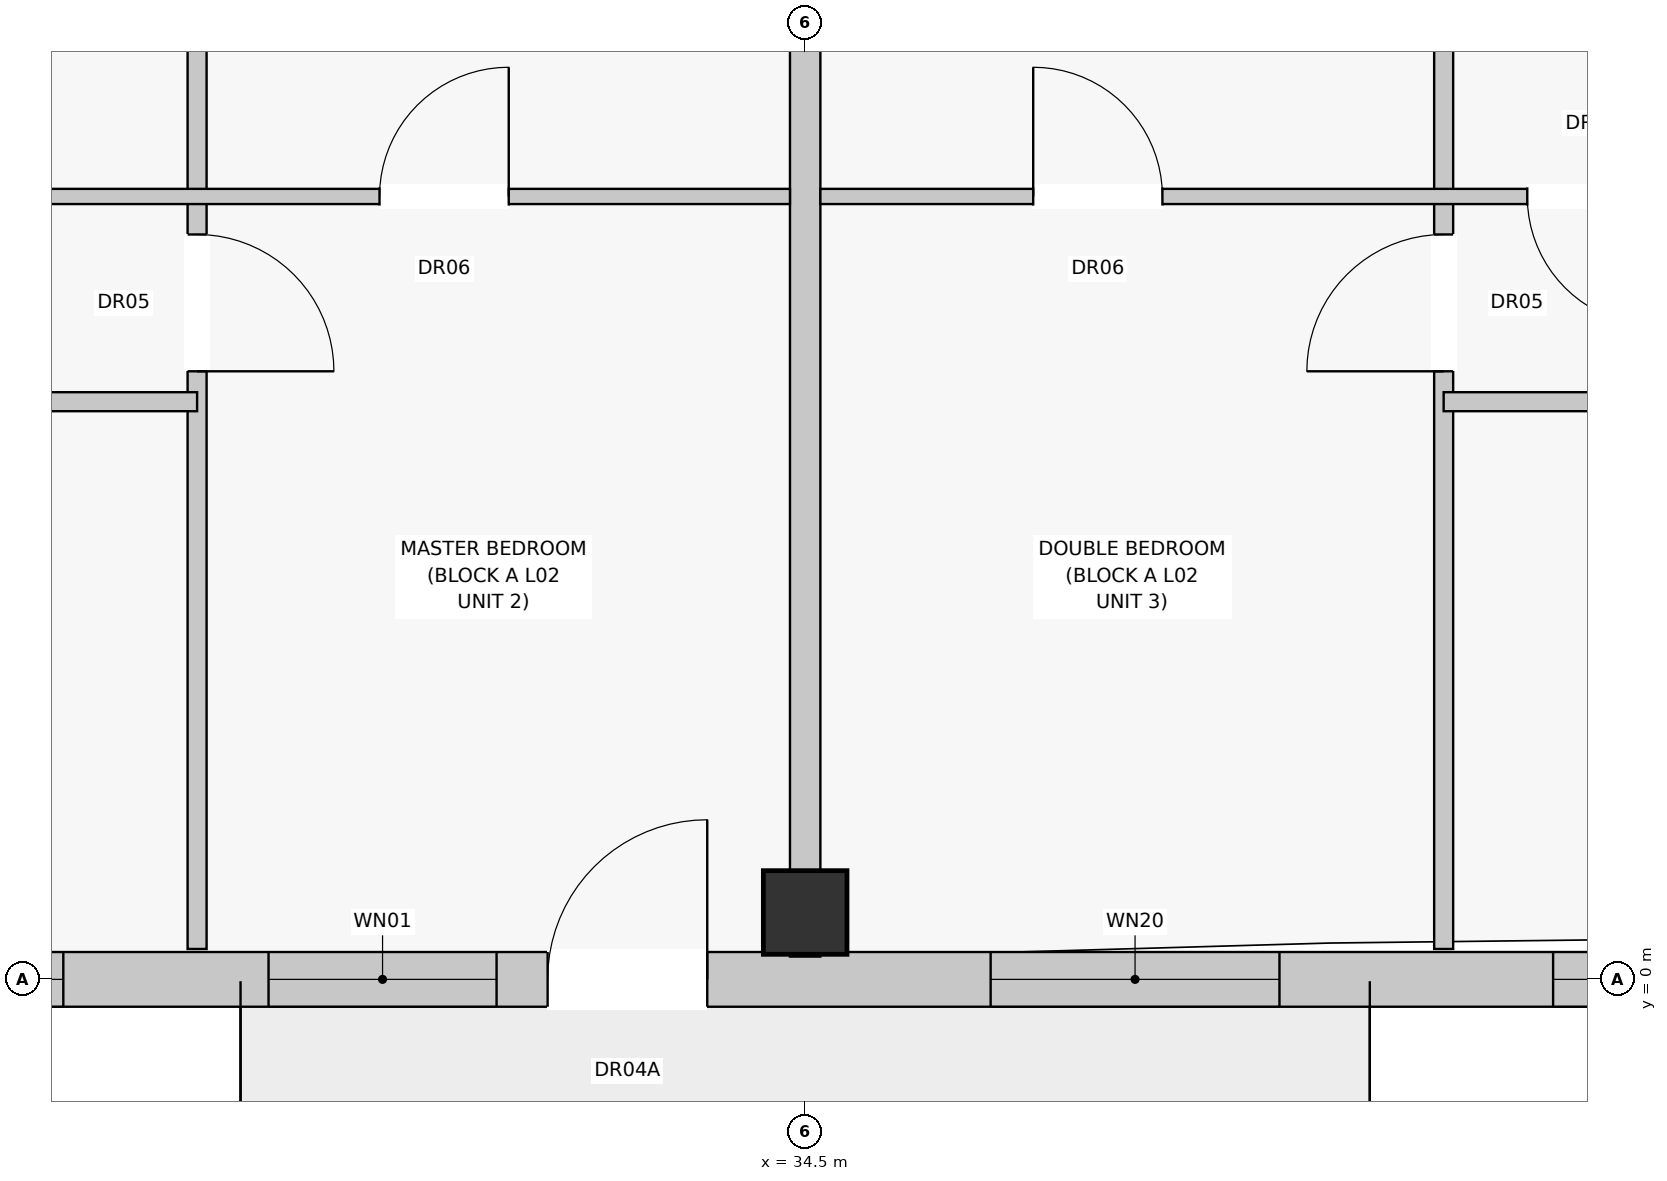
"""IFC4 building model, lengths in metres.
Left out: names, types, materials, properties, quantities, classifications, styles, units other than length and angle.
Written with IfcOpenShell. Run it as: python <this file> out.ifc"""

import sys

from ifc_helpers import new_model, si_unit, direction, frame, frame_2d, origin, origin_with_axes, origin_2d, place, context, subcontext, project, spatial, rectangle, extrude, element, fill, save


model = new_model("IFC4")
c1 = context("Model", 3, precision=1e-05, world=origin(), true_north=direction((0.0, 1.0)))
c2 = subcontext(c1, "Body", "Model", "MODEL_VIEW")
j1 = project(units=[si_unit("LENGTHUNIT", "METRE"), si_unit("PLANEANGLEUNIT", "RADIAN")], contexts=[c1])
p1 = place(None, origin())
s1 = spatial("IfcSite", under=j1, at=p1, CompositionType="ELEMENT")
p2 = place(p1, origin())
s2 = spatial("IfcBuilding", under=s1, at=p2, CompositionType="ELEMENT")
p3 = place(p2, frame((0.0, 0.0, 8.0)))
s3 = spatial("IfcBuildingStorey", under=s2, at=p3, CompositionType="ELEMENT", Elevation=8.0)
p4 = place(p3, frame((34.5, 0.44, 0.0), z_axis=(0.0, 0.0, 1.0), x_axis=(1.0, 0.0, 0.0)))
e1 = element("IfcColumn", 1, at=p4, inside=s3, PredefinedType="COLUMN", context=c2, shape_type="SweptSolid", body=[
    extrude(rectangle(XDim=0.55, YDim=0.55, at=origin_2d()), origin(), (0.0, 0.0, 1.0), 3.2),
])
p5 = place(p3, frame((0.17, 0.0, 0.0), z_axis=(0.0, 0.0, 1.0), x_axis=(1.0, 0.0, 0.0)))
e2 = element("IfcWall", 2, at=p5, inside=s3, PredefinedType="STANDARD", context=c2, shape_type="SweptSolid", body=[
    extrude(rectangle(XDim=54.86, YDim=0.36, at=frame_2d((27.43, 0.0))), origin(), (0.0, 0.0, 1.0), 2.94),
])
p6 = place(p5, frame((3.736, 0.0, 0.0)))
e3 = element("IfcOpeningElement", 3, at=p6, cuts=e2, PredefinedType="OPENING", context=c2, shape_type="SweptSolid", body=[
    extrude(rectangle(XDim=1.05, YDim=2.12, at=frame_2d((0.525, 1.06))), frame((0.0, 0.192, 0.0), z_axis=(0.0, -1.0, 0.0), x_axis=(1.0, 0.0, 0.0)), (0.0, 0.0, 1.0), 0.384),
])
p7 = place(p5, frame((18.636, 0.0, 0.0)))
e4 = element("IfcOpeningElement", 4, at=p7, cuts=e2, PredefinedType="OPENING", context=c2, shape_type="SweptSolid", body=[
    extrude(rectangle(XDim=1.05, YDim=2.12, at=frame_2d((0.525, 1.06))), frame((0.0, 0.192, 0.0), z_axis=(0.0, -1.0, 0.0), x_axis=(1.0, 0.0, 0.0)), (0.0, 0.0, 1.0), 0.384),
])
p8 = place(p5, frame((32.636, 0.0, 0.0)))
e5 = element("IfcOpeningElement", 5, at=p8, cuts=e2, PredefinedType="OPENING", context=c2, shape_type="SweptSolid", body=[
    extrude(rectangle(XDim=1.05, YDim=2.12, at=frame_2d((0.525, 1.06))), frame((0.0, 0.192, 0.0), z_axis=(0.0, -1.0, 0.0), x_axis=(1.0, 0.0, 0.0)), (0.0, 0.0, 1.0), 0.384),
])
p9 = place(p5, frame((46.441, 0.0, 0.0)))
e6 = element("IfcOpeningElement", 6, at=p9, cuts=e2, PredefinedType="OPENING", context=c2, shape_type="SweptSolid", body=[
    extrude(rectangle(XDim=1.05, YDim=2.12, at=frame_2d((0.525, 1.06))), frame((0.0, 0.192, 0.0), z_axis=(0.0, -1.0, 0.0), x_axis=(1.0, 0.0, 0.0)), (0.0, 0.0, 1.0), 0.384),
])
p10 = place(p5, frame((1.95, 0.0, 0.72)))
e7 = element("IfcOpeningElement", 7, at=p10, cuts=e2, PredefinedType="OPENING", context=c2, shape_type="SweptSolid", body=[
    extrude(rectangle(XDim=1.1, YDim=1.5, at=frame_2d((0.55, 0.75))), frame((0.0, 0.192, 0.0), z_axis=(0.0, -1.0, 0.0), x_axis=(1.0, 0.0, 0.0)), (0.0, 0.0, 1.0), 0.384),
])
p11 = place(p5, frame((7.232, 0.0, 0.72)))
e8 = element("IfcOpeningElement", 8, at=p11, cuts=e2, PredefinedType="OPENING", context=c2, shape_type="SweptSolid", body=[
    extrude(rectangle(XDim=1.9, YDim=1.85, at=frame_2d((0.95, 0.925))), frame((0.0, 0.192, 0.0), z_axis=(0.0, -1.0, 0.0), x_axis=(1.0, 0.0, 0.0)), (0.0, 0.0, 1.0), 0.384),
])
p12 = place(p5, frame((10.85, 0.0, 0.72)))
e9 = element("IfcOpeningElement", 9, at=p12, cuts=e2, PredefinedType="OPENING", context=c2, shape_type="SweptSolid", body=[
    extrude(rectangle(XDim=1.1, YDim=1.5, at=frame_2d((0.55, 0.75))), frame((0.0, 0.192, 0.0), z_axis=(0.0, -1.0, 0.0), x_axis=(1.0, 0.0, 0.0)), (0.0, 0.0, 1.0), 0.384),
])
p13 = place(p5, frame((16.25, 0.0, 0.72)))
e10 = element("IfcOpeningElement", 10, at=p13, cuts=e2, PredefinedType="OPENING", context=c2, shape_type="SweptSolid", body=[
    extrude(rectangle(XDim=1.1, YDim=1.5, at=frame_2d((0.55, 0.75))), frame((0.0, 0.192, 0.0), z_axis=(0.0, -1.0, 0.0), x_axis=(1.0, 0.0, 0.0)), (0.0, 0.0, 1.0), 0.384),
])
p14 = place(p5, frame((21.55, 0.0, 0.72)))
e11 = element("IfcOpeningElement", 11, at=p14, cuts=e2, PredefinedType="OPENING", context=c2, shape_type="SweptSolid", body=[
    extrude(rectangle(XDim=1.9, YDim=1.85, at=frame_2d((0.95, 0.925))), frame((0.0, 0.192, 0.0), z_axis=(0.0, -1.0, 0.0), x_axis=(1.0, 0.0, 0.0)), (0.0, 0.0, 1.0), 0.384),
])
p15 = place(p5, frame((28.35, 0.0, 0.72)))
e12 = element("IfcOpeningElement", 12, at=p15, cuts=e2, PredefinedType="OPENING", context=c2, shape_type="SweptSolid", body=[
    extrude(rectangle(XDim=1.1, YDim=1.5, at=frame_2d((0.55, 0.75))), frame((0.0, 0.192, 0.0), z_axis=(0.0, -1.0, 0.0), x_axis=(1.0, 0.0, 0.0)), (0.0, 0.0, 1.0), 0.384),
])
p16 = place(p5, frame((30.8, 0.0, 0.85)))
e13 = element("IfcOpeningElement", 13, at=p16, cuts=e2, PredefinedType="OPENING", context=c2, shape_type="SweptSolid", body=[
    extrude(rectangle(XDim=1.5, YDim=1.65, at=frame_2d((0.75, 0.825))), frame((0.0, 0.192, 0.0), z_axis=(0.0, -1.0, 0.0), x_axis=(1.0, 0.0, 0.0)), (0.0, 0.0, 1.0), 0.384),
])
p17 = place(p5, frame((35.55, 0.0, 0.72)))
e14 = element("IfcOpeningElement", 14, at=p17, cuts=e2, PredefinedType="OPENING", context=c2, shape_type="SweptSolid", body=[
    extrude(rectangle(XDim=1.9, YDim=1.85, at=frame_2d((0.95, 0.925))), frame((0.0, 0.192, 0.0), z_axis=(0.0, -1.0, 0.0), x_axis=(1.0, 0.0, 0.0)), (0.0, 0.0, 1.0), 0.384),
])
p18 = place(p5, frame((39.25, 0.0, 0.72)))
e15 = element("IfcOpeningElement", 15, at=p18, cuts=e2, PredefinedType="OPENING", context=c2, shape_type="SweptSolid", body=[
    extrude(rectangle(XDim=1.1, YDim=1.5, at=frame_2d((0.55, 0.75))), frame((0.0, 0.192, 0.0), z_axis=(0.0, -1.0, 0.0), x_axis=(1.0, 0.0, 0.0)), (0.0, 0.0, 1.0), 0.384),
])
p19 = place(p5, frame((44.3, 0.0, 0.8)))
e16 = element("IfcOpeningElement", 16, at=p19, cuts=e2, PredefinedType="OPENING", context=c2, shape_type="SweptSolid", body=[
    extrude(rectangle(XDim=1.8, YDim=1.7, at=frame_2d((0.9, 0.85))), frame((0.0, 0.192, 0.0), z_axis=(0.0, -1.0, 0.0), x_axis=(1.0, 0.0, 0.0)), (0.0, 0.0, 1.0), 0.384),
])
p20 = place(p5, frame((49.15, 0.0, 0.72)))
e17 = element("IfcOpeningElement", 17, at=p20, cuts=e2, PredefinedType="OPENING", context=c2, shape_type="SweptSolid", body=[
    extrude(rectangle(XDim=1.9, YDim=1.85, at=frame_2d((0.95, 0.925))), frame((0.0, 0.192, 0.0), z_axis=(0.0, -1.0, 0.0), x_axis=(1.0, 0.0, 0.0)), (0.0, 0.0, 1.0), 0.384),
])
p21 = place(p5, frame((52.95, 0.0, 0.72)))
e18 = element("IfcOpeningElement", 18, at=p21, cuts=e2, PredefinedType="OPENING", context=c2, shape_type="SweptSolid", body=[
    extrude(rectangle(XDim=1.1, YDim=1.5, at=frame_2d((0.55, 0.75))), frame((0.0, 0.192, 0.0), z_axis=(0.0, -1.0, 0.0), x_axis=(1.0, 0.0, 0.0)), (0.0, 0.0, 1.0), 0.384),
])
p22 = place(p3, frame((34.5, 7.85, 0.0), z_axis=(0.0, 0.0, 1.0), x_axis=(0.0, -1.0, 0.0)))
e19 = element("IfcWall", 19, at=p22, inside=s3, PredefinedType="PARTITIONING", context=c2, shape_type="SweptSolid", body=[
    extrude(rectangle(XDim=7.7, YDim=0.2, at=frame_2d((3.85, 0.0))), origin(), (0.0, 0.0, 1.0), 2.94),
])
p23 = place(p3, frame((30.5, 7.85, 0.0), z_axis=(0.0, 0.0, 1.0), x_axis=(0.0, -1.0, 0.0)))
e20 = element("IfcWall", 20, at=p23, inside=s3, PredefinedType="PARTITIONING", context=c2, shape_type="SweptSolid", body=[
    extrude(rectangle(XDim=7.65, YDim=0.125, at=frame_2d((3.825, 0.0))), origin(), (0.0, 0.0, 1.0), 2.94),
])
p24 = place(p23, frame((2.95, 0.0, 0.0)))
e21 = element("IfcOpeningElement", 21, at=p24, cuts=e20, PredefinedType="OPENING", context=c2, shape_type="SweptSolid", body=[
    extrude(rectangle(XDim=0.9, YDim=2.1, at=frame_2d((0.45, 1.05))), frame((0.0, 0.074, 0.0), z_axis=(0.0, -1.0, 0.0), x_axis=(1.0, 0.0, 0.0)), (0.0, 0.0, 1.0), 0.149),
])
p25 = place(p3, frame((20.1, 5.15, 0.0), z_axis=(0.0, 0.0, 1.0), x_axis=(1.0, 0.0, 0.0)))
e22 = element("IfcWall", 22, at=p25, inside=s3, PredefinedType="PARTITIONING", context=c2, shape_type="SweptSolid", body=[
    extrude(rectangle(XDim=14.3, YDim=0.1, at=frame_2d((7.15, 0.0))), origin(), (0.0, 0.0, 1.0), 2.94),
])
p26 = place(p25, frame((1.6, 0.0, 0.0)))
e23 = element("IfcOpeningElement", 23, at=p26, cuts=e22, PredefinedType="OPENING", context=c2, shape_type="SweptSolid", body=[
    extrude(rectangle(XDim=0.9, YDim=2.1, at=frame_2d((0.45, 1.05))), frame((0.0, 0.062, 0.0), z_axis=(0.0, -1.0, 0.0), x_axis=(1.0, 0.0, 0.0)), (0.0, 0.0, 1.0), 0.124),
])
p27 = place(p25, frame((5.1, 0.0, 0.0)))
e24 = element("IfcOpeningElement", 24, at=p27, cuts=e22, PredefinedType="OPENING", context=c2, shape_type="SweptSolid", body=[
    extrude(rectangle(XDim=0.85, YDim=2.05, at=frame_2d((0.425, 1.025))), frame((0.0, 0.062, 0.0), z_axis=(0.0, -1.0, 0.0), x_axis=(1.0, 0.0, 0.0)), (0.0, 0.0, 1.0), 0.124),
])
p28 = place(p25, frame((8.2, 0.0, 0.0)))
e25 = element("IfcOpeningElement", 25, at=p28, cuts=e22, PredefinedType="OPENING", context=c2, shape_type="SweptSolid", body=[
    extrude(rectangle(XDim=0.85, YDim=2.05, at=frame_2d((0.425, 1.025))), frame((0.0, 0.062, 0.0), z_axis=(0.0, -1.0, 0.0), x_axis=(1.0, 0.0, 0.0)), (0.0, 0.0, 1.0), 0.124),
])
p29 = place(p25, frame((11.6, 0.0, 0.0)))
e26 = element("IfcOpeningElement", 26, at=p29, cuts=e22, PredefinedType="OPENING", context=c2, shape_type="SweptSolid", body=[
    extrude(rectangle(XDim=0.85, YDim=2.05, at=frame_2d((0.425, 1.025))), frame((0.0, 0.062, 0.0), z_axis=(0.0, -1.0, 0.0), x_axis=(1.0, 0.0, 0.0)), (0.0, 0.0, 1.0), 0.124),
])
p30 = place(p3, frame((20.1, 3.8, 0.0), z_axis=(0.0, 0.0, 1.0), x_axis=(1.0, 0.0, 0.0)))
e27 = element("IfcWall", 27, at=p30, inside=s3, PredefinedType="PARTITIONING", context=c2, shape_type="SweptSolid", body=[
    extrude(rectangle(XDim=10.4, YDim=0.125, at=frame_2d((5.2, 0.0))), origin(), (0.0, 0.0, 1.0), 2.94),
])
p31 = place(p30, frame((2.0, 0.0, 0.0)))
e28 = element("IfcOpeningElement", 28, at=p31, cuts=e27, PredefinedType="OPENING", context=c2, shape_type="SweptSolid", body=[
    extrude(rectangle(XDim=0.9, YDim=2.1, at=frame_2d((0.45, 1.05))), frame((0.0, 0.074, 0.0), z_axis=(0.0, -1.0, 0.0), x_axis=(1.0, 0.0, 0.0)), (0.0, 0.0, 1.0), 0.149),
])
p32 = place(p30, frame((7.2, 0.0, 0.0)))
e29 = element("IfcOpeningElement", 29, at=p32, cuts=e27, PredefinedType="OPENING", context=c2, shape_type="SweptSolid", body=[
    extrude(rectangle(XDim=0.9, YDim=2.1, at=frame_2d((0.45, 1.05))), frame((0.0, 0.074, 0.0), z_axis=(0.0, -1.0, 0.0), x_axis=(1.0, 0.0, 0.0)), (0.0, 0.0, 1.0), 0.149),
])
p33 = place(p3, frame((38.7, 7.85, 0.0), z_axis=(0.0, 0.0, 1.0), x_axis=(0.0, -1.0, 0.0)))
e30 = element("IfcWall", 30, at=p33, inside=s3, PredefinedType="PARTITIONING", context=c2, shape_type="SweptSolid", body=[
    extrude(rectangle(XDim=7.65, YDim=0.125, at=frame_2d((3.825, 0.0))), origin(), (0.0, 0.0, 1.0), 2.94),
])
p34 = place(p33, frame((2.95, 0.0, 0.0)))
e31 = element("IfcOpeningElement", 31, at=p34, cuts=e30, PredefinedType="OPENING", context=c2, shape_type="SweptSolid", body=[
    extrude(rectangle(XDim=0.9, YDim=2.1, at=frame_2d((0.45, 1.05))), frame((0.0, 0.074, 0.0), z_axis=(0.0, -1.0, 0.0), x_axis=(1.0, 0.0, 0.0)), (0.0, 0.0, 1.0), 0.149),
])
p35 = place(p3, frame((34.6, 5.15, 0.0), z_axis=(0.0, 0.0, 1.0), x_axis=(1.0, 0.0, 0.0)))
e32 = element("IfcWall", 32, at=p35, inside=s3, PredefinedType="PARTITIONING", context=c2, shape_type="SweptSolid", body=[
    extrude(rectangle(XDim=8.6, YDim=0.1, at=frame_2d((4.3, 0.0))), origin(), (0.0, 0.0, 1.0), 2.94),
])
p36 = place(p35, frame((1.4, 0.0, 0.0)))
e33 = element("IfcOpeningElement", 33, at=p36, cuts=e32, PredefinedType="OPENING", context=c2, shape_type="SweptSolid", body=[
    extrude(rectangle(XDim=0.85, YDim=2.05, at=frame_2d((0.425, 1.025))), frame((0.0, 0.062, 0.0), z_axis=(0.0, -1.0, 0.0), x_axis=(1.0, 0.0, 0.0)), (0.0, 0.0, 1.0), 0.124),
])
p37 = place(p35, frame((4.65, 0.0, 0.0)))
e34 = element("IfcOpeningElement", 34, at=p37, cuts=e32, PredefinedType="OPENING", context=c2, shape_type="SweptSolid", body=[
    extrude(rectangle(XDim=0.85, YDim=2.05, at=frame_2d((0.425, 1.025))), frame((0.0, 0.062, 0.0), z_axis=(0.0, -1.0, 0.0), x_axis=(1.0, 0.0, 0.0)), (0.0, 0.0, 1.0), 0.124),
])
p38 = place(p35, frame((6.8, 0.0, 0.0)))
e35 = element("IfcOpeningElement", 35, at=p38, cuts=e32, PredefinedType="OPENING", context=c2, shape_type="SweptSolid", body=[
    extrude(rectangle(XDim=0.85, YDim=2.1, at=frame_2d((0.425, 1.05))), frame((0.0, 0.062, 0.0), z_axis=(0.0, -1.0, 0.0), x_axis=(1.0, 0.0, 0.0)), (0.0, 0.0, 1.0), 0.124),
])
p39 = place(p3, frame((38.7, 3.8, 0.0), z_axis=(0.0, 0.0, 1.0), x_axis=(1.0, 0.0, 0.0)))
e36 = element("IfcWall", 36, at=p39, inside=s3, PredefinedType="PARTITIONING", context=c2, shape_type="SweptSolid", body=[
    extrude(rectangle(XDim=4.5, YDim=0.125, at=frame_2d((2.25, 0.0))), origin(), (0.0, 0.0, 1.0), 2.94),
])
p40 = place(p39, frame((1.6, 0.0, 0.0)))
e37 = element("IfcOpeningElement", 37, at=p40, cuts=e36, PredefinedType="OPENING", context=c2, shape_type="SweptSolid", body=[
    extrude(rectangle(XDim=0.9, YDim=2.1, at=frame_2d((0.45, 1.05))), frame((0.0, 0.074, 0.0), z_axis=(0.0, -1.0, 0.0), x_axis=(1.0, 0.0, 0.0)), (0.0, 0.0, 1.0), 0.149),
])
p41 = place(p8, origin_with_axes())
e38 = element("IfcDoor", 38, at=p41, inside=s3, OperationType="SINGLE_SWING_RIGHT", PredefinedType="DOOR", context=c2, shape_type="SweptSolid", body=[
    extrude(rectangle(XDim=1.05, YDim=2.12, at=frame_2d((0.525, 1.06))), frame((0.0, 0.025, 0.0), z_axis=(0.0, -1.0, 0.0), x_axis=(1.0, 0.0, 0.0)), (0.0, 0.0, 1.0), 0.05),
])
fill(e5, e38)
p42 = place(p15, origin_with_axes())
e39 = element("IfcWindow", 39, at=p42, inside=s3, PartitioningType="SINGLE_PANEL", PredefinedType="WINDOW", context=c2, shape_type="SweptSolid", body=[
    extrude(rectangle(XDim=1.1, YDim=1.5, at=frame_2d((0.55, 0.75))), frame((0.0, 0.03, 0.0), z_axis=(0.0, -1.0, 0.0), x_axis=(1.0, 0.0, 0.0)), (0.0, 0.0, 1.0), 0.06),
])
fill(e12, e39)
p43 = place(p16, origin_with_axes())
e40 = element("IfcWindow", 40, at=p43, inside=s3, PartitioningType="SINGLE_PANEL", PredefinedType="WINDOW", context=c2, shape_type="SweptSolid", body=[
    extrude(rectangle(XDim=1.5, YDim=1.65, at=frame_2d((0.75, 0.825))), frame((0.0, 0.03, 0.0), z_axis=(0.0, -1.0, 0.0), x_axis=(1.0, 0.0, 0.0)), (0.0, 0.0, 1.0), 0.06),
])
fill(e13, e40)
p44 = place(p17, origin_with_axes())
e41 = element("IfcWindow", 41, at=p44, inside=s3, PartitioningType="SINGLE_PANEL", PredefinedType="WINDOW", context=c2, shape_type="SweptSolid", body=[
    extrude(rectangle(XDim=1.9, YDim=1.85, at=frame_2d((0.95, 0.925))), frame((0.0, 0.03, 0.0), z_axis=(0.0, -1.0, 0.0), x_axis=(1.0, 0.0, 0.0)), (0.0, 0.0, 1.0), 0.06),
])
fill(e14, e41)
p45 = place(p18, origin_with_axes())
e42 = element("IfcWindow", 42, at=p45, inside=s3, PartitioningType="SINGLE_PANEL", PredefinedType="WINDOW", context=c2, shape_type="SweptSolid", body=[
    extrude(rectangle(XDim=1.1, YDim=1.5, at=frame_2d((0.55, 0.75))), frame((0.0, 0.03, 0.0), z_axis=(0.0, -1.0, 0.0), x_axis=(1.0, 0.0, 0.0)), (0.0, 0.0, 1.0), 0.06),
])
fill(e15, e42)
p46 = place(p24, origin_with_axes())
e43 = element("IfcDoor", 43, at=p46, inside=s3, OperationType="SINGLE_SWING_RIGHT", PredefinedType="DOOR", context=c2, shape_type="SweptSolid", body=[
    extrude(rectangle(XDim=0.9, YDim=2.1, at=frame_2d((0.45, 1.05))), frame((0.0, 0.025, 0.0), z_axis=(0.0, -1.0, 0.0), x_axis=(1.0, 0.0, 0.0)), (0.0, 0.0, 1.0), 0.05),
])
fill(e21, e43)
p47 = place(p29, origin_with_axes())
e44 = element("IfcDoor", 44, at=p47, inside=s3, OperationType="SINGLE_SWING_RIGHT", PredefinedType="DOOR", context=c2, shape_type="SweptSolid", body=[
    extrude(rectangle(XDim=0.85, YDim=2.05, at=frame_2d((0.425, 1.025))), frame((0.0, 0.025, 0.0), z_axis=(0.0, -1.0, 0.0), x_axis=(1.0, 0.0, 0.0)), (0.0, 0.0, 1.0), 0.05),
])
fill(e26, e44)
p48 = place(p34, frame((0.9, 0.0, 0.0), z_axis=(0.0, 0.0, 1.0), x_axis=(-1.0, 0.0, 0.0)))
e45 = element("IfcDoor", 45, at=p48, inside=s3, OperationType="SINGLE_SWING_RIGHT", PredefinedType="DOOR", context=c2, shape_type="SweptSolid", body=[
    extrude(rectangle(XDim=0.9, YDim=2.1, at=frame_2d((0.45, 1.05))), frame((0.0, 0.025, 0.0), z_axis=(0.0, -1.0, 0.0), x_axis=(1.0, 0.0, 0.0)), (0.0, 0.0, 1.0), 0.05),
])
fill(e31, e45)
p49 = place(p36, origin_with_axes())
e46 = element("IfcDoor", 46, at=p49, inside=s3, OperationType="SINGLE_SWING_LEFT", PredefinedType="DOOR", context=c2, shape_type="SweptSolid", body=[
    extrude(rectangle(XDim=0.85, YDim=2.05, at=frame_2d((0.425, 1.025))), frame((0.0, 0.025, 0.0), z_axis=(0.0, -1.0, 0.0), x_axis=(1.0, 0.0, 0.0)), (0.0, 0.0, 1.0), 0.05),
])
fill(e33, e46)
p50 = place(p37, frame((0.85, 0.0, 0.0), z_axis=(0.0, 0.0, 1.0), x_axis=(-1.0, 0.0, 0.0)))
e47 = element("IfcDoor", 47, at=p50, inside=s3, OperationType="SINGLE_SWING_RIGHT", PredefinedType="DOOR", context=c2, shape_type="SweptSolid", body=[
    extrude(rectangle(XDim=0.85, YDim=2.05, at=frame_2d((0.425, 1.025))), frame((0.0, 0.025, 0.0), z_axis=(0.0, -1.0, 0.0), x_axis=(1.0, 0.0, 0.0)), (0.0, 0.0, 1.0), 0.05),
])
fill(e34, e47)
save(model, sys.argv[1])
